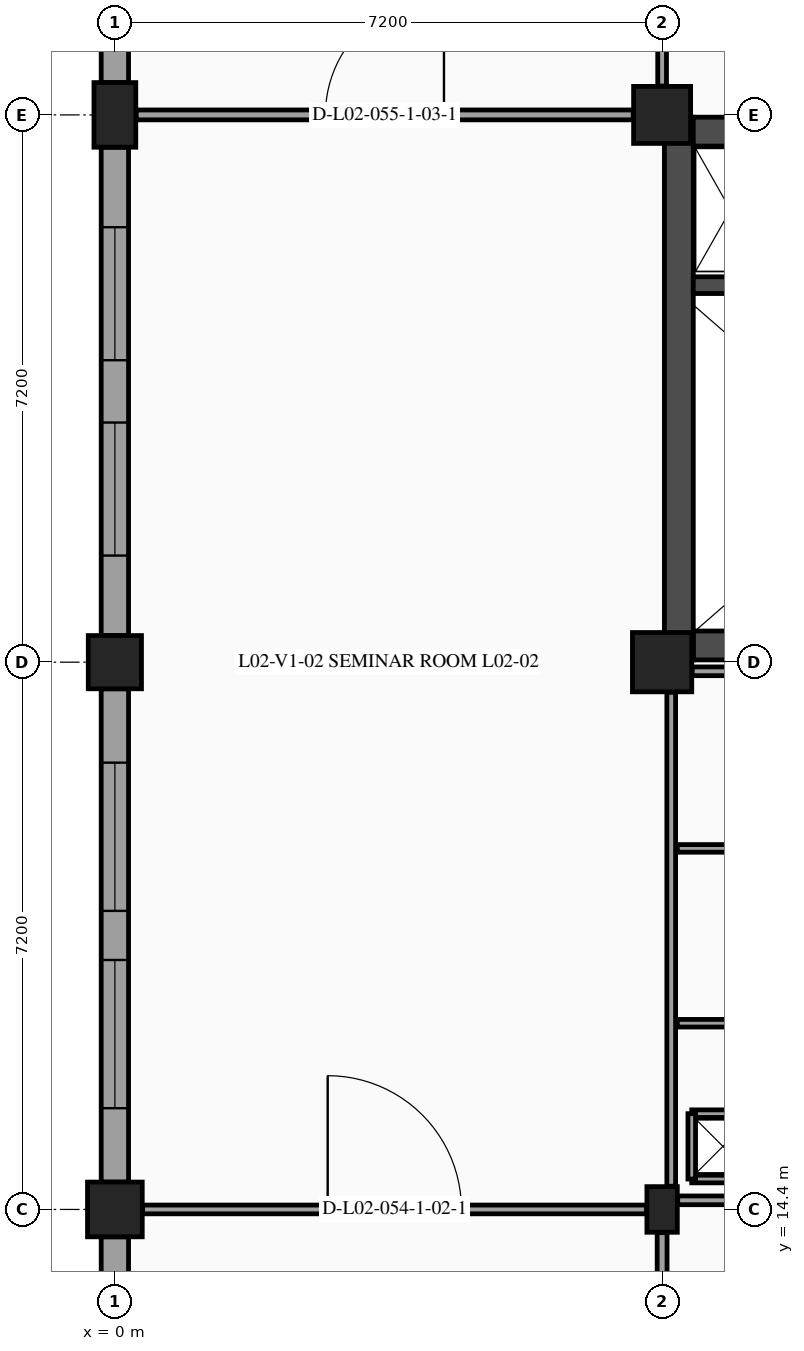
"""IFC4 building model, lengths in metres.
Left out: names, types, materials, properties, quantities, classifications, styles, units other than length and angle.
Written with IfcOpenShell. Run it as: python <this file> out.ifc"""

import sys

from ifc_helpers import new_model, si_unit, direction, frame, frame_2d, origin, origin_2d, place, context, subcontext, project, spatial, rectangle, extrude, element, fill, save


model = new_model("IFC4")
c1 = context("Model", 3, precision=1e-05, world=origin(), true_north=direction((0.0, 1.0)))
c2 = subcontext(c1, "Body", "Model", "MODEL_VIEW")
j1 = project(units=[si_unit("LENGTHUNIT", "METRE"), si_unit("PLANEANGLEUNIT", "RADIAN")], contexts=[c1])
p1 = place(None, origin())
s1 = spatial("IfcSite", under=j1, at=p1, CompositionType="ELEMENT")
p2 = place(p1, origin())
s2 = spatial("IfcBuilding", under=s1, at=p2, CompositionType="ELEMENT")
p3 = place(p2, frame((0.0, 0.0, 9.9)))
s3 = spatial("IfcBuildingStorey", under=s2, at=p3, CompositionType="ELEMENT", Elevation=9.9)
p4 = place(p3, frame((0.0, 14.4, 0.0), z_axis=(0.0, 0.0, 1.0), x_axis=(1.0, 0.0, 0.0)))
e1 = element("IfcColumn", 1, at=p4, inside=s3, PredefinedType="COLUMN", context=c2, shape_type="SweptSolid", body=[
    extrude(rectangle(XDim=0.72, YDim=0.72, at=origin_2d()), origin(), (0.0, 0.0, 1.0), 4.5),
])
p5 = place(p3, frame((0.0, 21.6, 0.0), z_axis=(0.0, 0.0, 1.0), x_axis=(1.0, 0.0, 0.0)))
e2 = element("IfcColumn", 2, at=p5, inside=s3, PredefinedType="COLUMN", context=c2, shape_type="SweptSolid", body=[
    extrude(rectangle(XDim=0.7, YDim=0.7, at=origin_2d()), origin(), (0.0, 0.0, 1.0), 4.5),
])
p6 = place(p3, frame((0.0, 28.8, 0.0), z_axis=(0.0, 0.0, 1.0), x_axis=(1.0, 0.0, 0.0)))
e3 = element("IfcColumn", 3, at=p6, inside=s3, PredefinedType="COLUMN", context=c2, shape_type="SweptSolid", body=[
    extrude(rectangle(XDim=0.55, YDim=0.85, at=origin_2d()), origin(), (0.0, 0.0, 1.0), 4.5),
])
p7 = place(p3, frame((7.2, 14.4, 0.0), z_axis=(0.0, 0.0, 1.0), x_axis=(1.0, 0.0, 0.0)))
e4 = element("IfcColumn", 4, at=p7, inside=s3, PredefinedType="PILASTER", context=c2, shape_type="SweptSolid", body=[
    extrude(rectangle(XDim=0.4, YDim=0.6, at=origin_2d()), origin(), (0.0, 0.0, 1.0), 4.5),
])
p8 = place(p3, frame((7.2, 21.6, 0.0), z_axis=(0.0, 0.0, 1.0), x_axis=(1.0, 0.0, 0.0)))
e5 = element("IfcColumn", 5, at=p8, inside=s3, PredefinedType="COLUMN", context=c2, shape_type="SweptSolid", body=[
    extrude(rectangle(XDim=0.78, YDim=0.78, at=origin_2d()), origin(), (0.0, 0.0, 1.0), 4.5),
])
p9 = place(p3, frame((7.2, 28.8, 0.0), z_axis=(0.0, 0.0, 1.0), x_axis=(1.0, 0.0, 0.0)))
e6 = element("IfcColumn", 6, at=p9, inside=s3, PredefinedType="COLUMN", context=c2, shape_type="SweptSolid", body=[
    extrude(rectangle(XDim=0.75, YDim=0.75, at=origin_2d()), origin(), (0.0, 0.0, 1.0), 4.5),
])
p10 = place(p3, frame((0.0, 7.575, 0.0), z_axis=(0.0, 0.0, 1.0), x_axis=(0.0, 1.0, 0.0)))
e7 = element("IfcWall", 7, at=p10, inside=s3, PredefinedType="STANDARD", context=c2, shape_type="SweptSolid", body=[
    extrude(rectangle(XDim=6.465, YDim=0.36, at=frame_2d((3.232, 0.0))), origin(), (0.0, 0.0, 1.0), 3.47),
])
p11 = place(p10, frame((1.54, 0.0, 1.15)))
e8 = element("IfcOpeningElement", 8, at=p11, cuts=e7, PredefinedType="OPENING", context=c2, shape_type="SweptSolid", body=[
    extrude(rectangle(XDim=0.8, YDim=1.5, at=frame_2d((0.4, 0.75))), frame((0.0, 0.19, 0.0), z_axis=(0.0, -1.0, 0.0), x_axis=(1.0, 0.0, 0.0)), (0.0, 0.0, 1.0), 0.38),
])
p12 = place(p10, frame((4.125, 0.0, 1.15)))
e9 = element("IfcOpeningElement", 9, at=p12, cuts=e7, PredefinedType="OPENING", context=c2, shape_type="SweptSolid", body=[
    extrude(rectangle(XDim=0.8, YDim=1.5, at=frame_2d((0.4, 0.75))), frame((0.0, 0.19, 0.0), z_axis=(0.0, -1.0, 0.0), x_axis=(1.0, 0.0, 0.0)), (0.0, 0.0, 1.0), 0.38),
])
p13 = place(p3, frame((0.0, 14.76, 0.0), z_axis=(0.0, 0.0, 1.0), x_axis=(0.0, 1.0, 0.0)))
e10 = element("IfcWall", 10, at=p13, inside=s3, PredefinedType="STANDARD", context=c2, shape_type="SweptSolid", body=[
    extrude(rectangle(XDim=6.49, YDim=0.36, at=frame_2d((3.245, 0.0))), origin(), (0.0, 0.0, 1.0), 3.47),
])
p14 = place(p13, frame((0.972, 0.0, 1.15)))
e11 = element("IfcOpeningElement", 11, at=p14, cuts=e10, PredefinedType="OPENING", context=c2, shape_type="SweptSolid", body=[
    extrude(rectangle(XDim=1.95, YDim=1.4, at=frame_2d((0.975, 0.7))), frame((0.0, 0.19, 0.0), z_axis=(0.0, -1.0, 0.0), x_axis=(1.0, 0.0, 0.0)), (0.0, 0.0, 1.0), 0.38),
])
p15 = place(p13, frame((3.568, 0.0, 1.15)))
e12 = element("IfcOpeningElement", 12, at=p15, cuts=e10, PredefinedType="OPENING", context=c2, shape_type="SweptSolid", body=[
    extrude(rectangle(XDim=1.95, YDim=1.4, at=frame_2d((0.975, 0.7))), frame((0.0, 0.19, 0.0), z_axis=(0.0, -1.0, 0.0), x_axis=(1.0, 0.0, 0.0)), (0.0, 0.0, 1.0), 0.38),
])
p16 = place(p3, frame((0.0, 21.95, 0.0), z_axis=(0.0, 0.0, 1.0), x_axis=(0.0, 1.0, 0.0)))
e13 = element("IfcWall", 13, at=p16, inside=s3, PredefinedType="STANDARD", context=c2, shape_type="SweptSolid", body=[
    extrude(rectangle(XDim=6.425, YDim=0.36, at=frame_2d((3.212, 0.0))), origin(), (0.0, 0.0, 1.0), 3.47),
])
p17 = place(p16, frame((1.052, 0.0, 1.15)))
e14 = element("IfcOpeningElement", 14, at=p17, cuts=e13, PredefinedType="OPENING", context=c2, shape_type="SweptSolid", body=[
    extrude(rectangle(XDim=1.75, YDim=1.4, at=frame_2d((0.875, 0.7))), frame((0.0, 0.19, 0.0), z_axis=(0.0, -1.0, 0.0), x_axis=(1.0, 0.0, 0.0)), (0.0, 0.0, 1.0), 0.38),
])
p18 = place(p16, frame((3.623, 0.0, 1.15)))
e15 = element("IfcOpeningElement", 15, at=p18, cuts=e13, PredefinedType="OPENING", context=c2, shape_type="SweptSolid", body=[
    extrude(rectangle(XDim=1.75, YDim=1.4, at=frame_2d((0.875, 0.7))), frame((0.0, 0.19, 0.0), z_axis=(0.0, -1.0, 0.0), x_axis=(1.0, 0.0, 0.0)), (0.0, 0.0, 1.0), 0.38),
])
p19 = place(p3, frame((0.0, 29.225, 0.0), z_axis=(0.0, 0.0, 1.0), x_axis=(0.0, 1.0, 0.0)))
e16 = element("IfcWall", 16, at=p19, inside=s3, PredefinedType="STANDARD", context=c2, shape_type="SweptSolid", body=[
    extrude(rectangle(XDim=6.475, YDim=0.36, at=frame_2d((3.237, 0.0))), origin(), (0.0, 0.0, 1.0), 3.47),
])
p20 = place(p19, frame((1.167, 0.0, 1.15)))
e17 = element("IfcOpeningElement", 17, at=p20, cuts=e16, PredefinedType="OPENING", context=c2, shape_type="SweptSolid", body=[
    extrude(rectangle(XDim=1.55, YDim=1.35, at=frame_2d((0.775, 0.675))), frame((0.0, 0.19, 0.0), z_axis=(0.0, -1.0, 0.0), x_axis=(1.0, 0.0, 0.0)), (0.0, 0.0, 1.0), 0.38),
])
p21 = place(p19, frame((3.758, 0.0, 1.15)))
e18 = element("IfcOpeningElement", 18, at=p21, cuts=e16, PredefinedType="OPENING", context=c2, shape_type="SweptSolid", body=[
    extrude(rectangle(XDim=1.55, YDim=1.35, at=frame_2d((0.775, 0.675))), frame((0.0, 0.19, 0.0), z_axis=(0.0, -1.0, 0.0), x_axis=(1.0, 0.0, 0.0)), (0.0, 0.0, 1.0), 0.38),
])
p22 = place(p3, frame((7.61, 21.82, 0.0), z_axis=(0.0, 0.0, 1.0), x_axis=(1.0, 0.0, 0.0)))
e19 = element("IfcWall", 19, at=p22, inside=s3, PredefinedType="SHEAR", context=c2, shape_type="SweptSolid", body=[
    extrude(rectangle(XDim=6.46, YDim=0.38, at=frame_2d((3.23, 0.0))), origin(), (0.0, 0.0, 1.0), 4.225),
])
p23 = place(p3, frame((7.42, 28.77, 0.0), z_axis=(0.0, 0.0, 1.0), x_axis=(0.0, -1.0, 0.0)))
e20 = element("IfcWall", 20, at=p23, inside=s3, PredefinedType="SHEAR", context=c2, shape_type="SweptSolid", body=[
    extrude(rectangle(XDim=7.14, YDim=0.38, at=frame_2d((3.57, 0.0))), origin(), (0.0, 0.0, 1.0), 4.225),
])
p24 = place(p3, frame((7.61, 28.58, 0.0), z_axis=(0.0, 0.0, 1.0), x_axis=(1.0, 0.0, 0.0)))
e21 = element("IfcWall", 21, at=p24, inside=s3, PredefinedType="SHEAR", context=c2, shape_type="SweptSolid", body=[
    extrude(rectangle(XDim=6.46, YDim=0.38, at=frame_2d((3.23, 0.0))), origin(), (0.0, 0.0, 1.0), 4.225),
])
p25 = place(p24, frame((1.42, 0.0, 0.0)))
e22 = element("IfcOpeningElement", 22, at=p25, cuts=e21, PredefinedType="OPENING", context=c2, shape_type="SweptSolid", body=[
    extrude(rectangle(XDim=0.85, YDim=2.1, at=frame_2d((0.425, 1.05))), frame((0.0, 0.2, 0.0), z_axis=(0.0, -1.0, 0.0), x_axis=(1.0, 0.0, 0.0)), (0.0, 0.0, 1.0), 0.4),
])
p26 = place(p3, frame((7.61, 26.56, 0.0), z_axis=(0.0, 0.0, 1.0), x_axis=(1.0, 0.0, 0.0)))
e23 = element("IfcWall", 23, at=p26, inside=s3, PredefinedType="SHEAR", context=c2, shape_type="SweptSolid", body=[
    extrude(rectangle(XDim=6.46, YDim=0.22, at=frame_2d((3.23, 0.0))), origin(), (0.0, 0.0, 1.0), 4.225),
])
p27 = place(p26, frame((5.2, 0.0, 0.0)))
e24 = element("IfcOpeningElement", 24, at=p27, cuts=e23, PredefinedType="OPENING", context=c2, shape_type="SweptSolid", body=[
    extrude(rectangle(XDim=1.2, YDim=2.2, at=frame_2d((0.6, 1.1))), frame((0.0, 0.12, 0.0), z_axis=(0.0, -1.0, 0.0), x_axis=(1.0, 0.0, 0.0)), (0.0, 0.0, 1.0), 0.24),
])
p28 = place(p3, frame((7.405, 14.52, 0.0), z_axis=(0.0, 0.0, 1.0), x_axis=(1.0, 0.0, 0.0)))
e25 = element("IfcWall", 25, at=p28, inside=s3, PredefinedType="PARTITIONING", context=c2, shape_type="SweptSolid", body=[
    extrude(rectangle(XDim=6.63, YDim=0.115, at=frame_2d((3.315, 0.0))), origin(), (0.0, 0.0, 1.0), 3.5),
])
p29 = place(p3, frame((7.595, 21.48, 0.0), z_axis=(0.0, 0.0, 1.0), x_axis=(1.0, 0.0, 0.0)))
e26 = element("IfcWall", 26, at=p29, inside=s3, PredefinedType="PARTITIONING", context=c2, shape_type="SweptSolid", body=[
    extrude(rectangle(XDim=6.45, YDim=0.115, at=frame_2d((3.225, 0.0))), origin(), (0.0, 0.0, 1.0), 3.5),
])
p30 = place(p3, frame((7.32, 14.705, 0.0), z_axis=(0.0, 0.0, 1.0), x_axis=(0.0, 1.0, 0.0)))
e27 = element("IfcWall", 27, at=p30, inside=s3, PredefinedType="PARTITIONING", context=c2, shape_type="SweptSolid", body=[
    extrude(rectangle(XDim=6.5, YDim=0.115, at=frame_2d((3.25, 0.0))), origin(), (0.0, 0.0, 1.0), 3.53),
])
for number, where, z_axis, x_axis in (
    (28, (7.4, 16.85, 0.0), (0.0, 0.0, 1.0), (1.0, 0.0, 0.0)),
    (29, (7.4, 19.15, 0.0), (0.0, 0.0, 1.0), (1.0, 0.0, 0.0)),
):
    element("IfcWall", number, at=place(p3, frame(where, z_axis=z_axis, x_axis=x_axis)), inside=s3, PredefinedType="PARTITIONING", context=c2, shape_type="SweptSolid", body=[
        extrude(rectangle(XDim=6.8, YDim=0.1, at=frame_2d((3.4, 0.0))), origin(), (0.0, 0.0, 1.0), 4.225),
    ])
for number, where, z_axis, x_axis in (
    (30, (7.59, 14.8, 0.0), (0.0, 0.0, 1.0), (1.0, 0.0, 0.0)),
    (31, (8.41, 15.66, 0.0), (0.0, 0.0, 1.0), (-1.0, 0.0, 0.0)),
):
    element("IfcWall", number, at=place(p3, frame(where, z_axis=z_axis, x_axis=x_axis)), inside=s3, PredefinedType="PARTITIONING", context=c2, shape_type="SweptSolid", body=[
        extrude(rectangle(XDim=0.82, YDim=0.1, at=frame_2d((0.41, 0.0))), origin(), (0.0, 0.0, 1.0), 4.225),
    ])
p31 = place(p3, frame((7.59, 15.66, 0.0), z_axis=(0.0, 0.0, 1.0), x_axis=(0.0, -1.0, 0.0)))
e32 = element("IfcWall", 32, at=p31, inside=s3, PredefinedType="PARTITIONING", context=c2, shape_type="SweptSolid", body=[
    extrude(rectangle(XDim=0.86, YDim=0.1, at=frame_2d((0.43, 0.0))), origin(), (0.0, 0.0, 1.0), 4.225),
])
p32 = place(p3, frame((7.2, 7.63, 0.0), z_axis=(0.0, 0.0, 1.0), x_axis=(0.0, 1.0, 0.0)))
e33 = element("IfcWall", 33, at=p32, inside=s3, PredefinedType="PARTITIONING", context=c2, shape_type="SweptSolid", body=[
    extrude(rectangle(XDim=6.465, YDim=0.13, at=frame_2d((3.232, 0.0))), origin(), (0.0, 0.0, 1.0), 3.535),
])
p33 = place(p3, frame((0.365, 14.4, 0.0), z_axis=(0.0, 0.0, 1.0), x_axis=(1.0, 0.0, 0.0)))
e34 = element("IfcWall", 34, at=p33, inside=s3, PredefinedType="PARTITIONING", context=c2, shape_type="SweptSolid", body=[
    extrude(rectangle(XDim=6.63, YDim=0.115, at=frame_2d((3.315, 0.0))), origin(), (0.0, 0.0, 1.0), 3.485),
])
p34 = place(p33, frame((2.435, 0.0, 0.0)))
e35 = element("IfcOpeningElement", 35, at=p34, cuts=e34, PredefinedType="OPENING", context=c2, shape_type="SweptSolid", body=[
    extrude(rectangle(XDim=1.76, YDim=2.3, at=frame_2d((0.88, 1.15))), frame((0.0, 0.067, 0.0), z_axis=(0.0, -1.0, 0.0), x_axis=(1.0, 0.0, 0.0)), (0.0, 0.0, 1.0), 0.135),
])
p35 = place(p3, frame((0.28, 28.8, 0.0), z_axis=(0.0, 0.0, 1.0), x_axis=(1.0, 0.0, 0.0)))
e36 = element("IfcWall", 36, at=p35, inside=s3, PredefinedType="PARTITIONING", context=c2, shape_type="SweptSolid", body=[
    extrude(rectangle(XDim=6.54, YDim=0.13, at=frame_2d((3.27, 0.0))), origin(), (0.0, 0.0, 1.0), 3.485),
])
p36 = place(p35, frame((2.49, 0.0, 0.0)))
e37 = element("IfcOpeningElement", 37, at=p36, cuts=e36, PredefinedType="OPENING", context=c2, shape_type="SweptSolid", body=[
    extrude(rectangle(XDim=1.56, YDim=2.25, at=frame_2d((0.78, 1.125))), frame((0.0, 0.075, 0.0), z_axis=(0.0, -1.0, 0.0), x_axis=(1.0, 0.0, 0.0)), (0.0, 0.0, 1.0), 0.15),
])
p37 = place(p3, frame((7.2, 29.18, 0.0), z_axis=(0.0, 0.0, 1.0), x_axis=(0.0, 1.0, 0.0)))
e38 = element("IfcWall", 38, at=p37, inside=s3, PredefinedType="PARTITIONING", context=c2, shape_type="SweptSolid", body=[
    extrude(rectangle(XDim=6.455, YDim=0.115, at=frame_2d((3.228, 0.0))), origin(), (0.0, 0.0, 1.0), 3.595),
])
p38 = place(p14, origin())
e39 = element("IfcWindow", 39, at=p38, inside=s3, PartitioningType="SINGLE_PANEL", PredefinedType="WINDOW", context=c2, shape_type="SweptSolid", body=[
    extrude(rectangle(XDim=1.95, YDim=1.4, at=frame_2d((0.975, 0.7))), frame((0.0, -0.08, 0.0), z_axis=(0.0, -1.0, 0.0), x_axis=(1.0, 0.0, 0.0)), (0.0, 0.0, 1.0), 0.06),
])
fill(e11, e39)
p39 = place(p15, origin())
e40 = element("IfcWindow", 40, at=p39, inside=s3, PartitioningType="SINGLE_PANEL", PredefinedType="WINDOW", context=c2, shape_type="SweptSolid", body=[
    extrude(rectangle(XDim=1.95, YDim=1.4, at=frame_2d((0.975, 0.7))), frame((0.0, -0.08, 0.0), z_axis=(0.0, -1.0, 0.0), x_axis=(1.0, 0.0, 0.0)), (0.0, 0.0, 1.0), 0.06),
])
fill(e12, e40)
p40 = place(p17, origin())
e41 = element("IfcWindow", 41, at=p40, inside=s3, PartitioningType="SINGLE_PANEL", PredefinedType="WINDOW", context=c2, shape_type="SweptSolid", body=[
    extrude(rectangle(XDim=1.75, YDim=1.4, at=frame_2d((0.875, 0.7))), frame((0.0, -0.08, 0.0), z_axis=(0.0, -1.0, 0.0), x_axis=(1.0, 0.0, 0.0)), (0.0, 0.0, 1.0), 0.06),
])
fill(e14, e41)
p41 = place(p18, origin())
e42 = element("IfcWindow", 42, at=p41, inside=s3, PartitioningType="SINGLE_PANEL", PredefinedType="WINDOW", context=c2, shape_type="SweptSolid", body=[
    extrude(rectangle(XDim=1.75, YDim=1.4, at=frame_2d((0.875, 0.7))), frame((0.0, -0.08, 0.0), z_axis=(0.0, -1.0, 0.0), x_axis=(1.0, 0.0, 0.0)), (0.0, 0.0, 1.0), 0.06),
])
fill(e15, e42)
p42 = place(p34, origin())
e43 = element("IfcDoor", 43, at=p42, inside=s3, OperationType="SINGLE_SWING_LEFT", PredefinedType="DOOR", context=c2, shape_type="SweptSolid", body=[
    extrude(rectangle(XDim=1.76, YDim=2.3, at=frame_2d((0.88, 1.15))), frame((0.0, 0.025, 0.0), z_axis=(0.0, -1.0, 0.0), x_axis=(1.0, 0.0, 0.0)), (0.0, 0.0, 1.0), 0.05),
])
fill(e35, e43)
p43 = place(p36, origin())
e44 = element("IfcDoor", 44, at=p43, inside=s3, OperationType="SINGLE_SWING_RIGHT", PredefinedType="DOOR", context=c2, shape_type="SweptSolid", body=[
    extrude(rectangle(XDim=1.56, YDim=2.25, at=frame_2d((0.78, 1.125))), frame((0.0, 0.025, 0.0), z_axis=(0.0, -1.0, 0.0), x_axis=(1.0, 0.0, 0.0)), (0.0, 0.0, 1.0), 0.05),
])
fill(e37, e44)
save(model, sys.argv[1])
